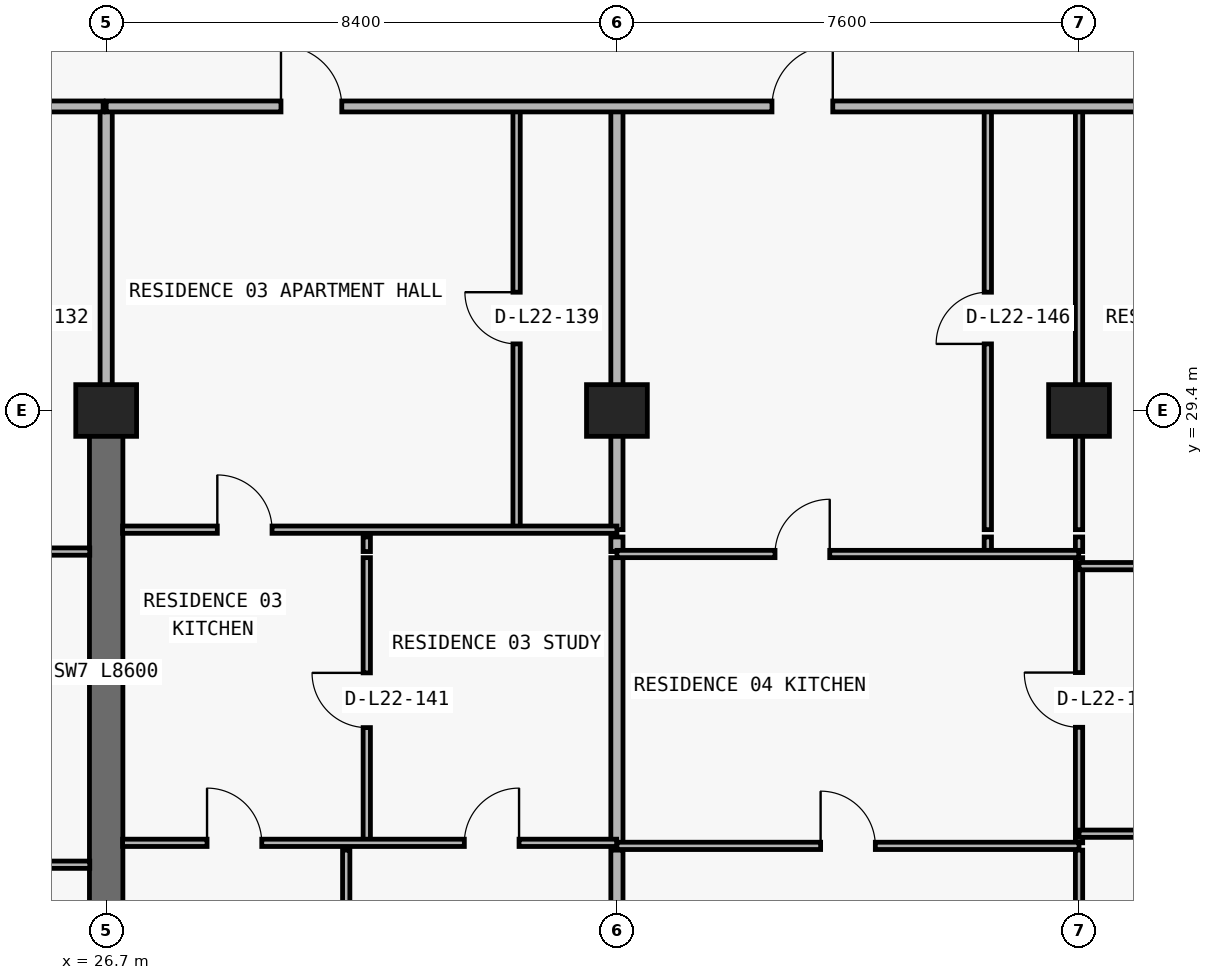
"""IFC4 building model, lengths in metres.
Left out: names, types, materials, properties, quantities, classifications, styles, units other than length and angle.
Written with IfcOpenShell. Run it as: python <this file> out.ifc"""

import sys

from ifc_helpers import new_model, si_unit, direction, frame, frame_2d, origin, origin_2d, place, context, subcontext, project, spatial, rectangle, extrude, element, fill, save


model = new_model("IFC4")
c1 = context("Model", 3, precision=1e-05, world=origin(), true_north=direction((0.0, 1.0)))
c2 = subcontext(c1, "Body", "Model", "MODEL_VIEW")
j1 = project(units=[si_unit("LENGTHUNIT", "METRE"), si_unit("PLANEANGLEUNIT", "RADIAN")], contexts=[c1])
p1 = place(None, origin())
s1 = spatial("IfcSite", under=j1, at=p1, CompositionType="ELEMENT")
p2 = place(p1, origin())
s2 = spatial("IfcBuilding", under=s1, at=p2, CompositionType="ELEMENT")
p3 = place(p2, frame((0.0, 0.0, 84.6)))
s3 = spatial("IfcBuildingStorey", under=s2, at=p3, CompositionType="ELEMENT", Elevation=84.6)
for number, where, z_axis, x_axis in (
    (1, (26.7, 29.4, 0.0), (0.0, 0.0, 1.0), (1.0, 0.0, 0.0)),
    (2, (35.1, 29.4, 0.0), (0.0, 0.0, 1.0), (1.0, 0.0, 0.0)),
    (3, (42.7, 29.4, 0.0), (0.0, 0.0, 1.0), (1.0, 0.0, 0.0)),
):
    element("IfcColumn", number, at=place(p3, frame(where, z_axis=z_axis, x_axis=x_axis)), inside=s3, PredefinedType="COLUMN", context=c2, shape_type="SweptSolid", body=[
        extrude(rectangle(XDim=1.0, YDim=0.85, at=origin_2d()), origin(), (0.0, 0.0, 1.0), 3.05),
    ])
p4 = place(p3, frame((26.7, 20.8, 0.0), z_axis=(0.0, 0.0, 1.0), x_axis=(0.0, 1.0, 0.0)))
e4 = element("IfcWall", 4, at=p4, inside=s3, PredefinedType="SHEAR", context=c2, shape_type="SweptSolid", body=[
    extrude(rectangle(XDim=8.6, YDim=0.55, at=frame_2d((4.3, 0.0))), origin(), (0.0, 0.0, 1.0), 3.05),
])
p5 = place(p3, frame((26.7, 29.405, 0.0), z_axis=(0.0, 0.0, 1.0), x_axis=(0.0, 1.0, 0.0)))
e5 = element("IfcWall", 5, at=p5, inside=s3, PredefinedType="PARTITIONING", context=c2, shape_type="SweptSolid", body=[
    extrude(rectangle(XDim=4.995, YDim=0.2, at=frame_2d((2.498, 0.0))), origin(), (0.0, 0.0, 1.0), 2.335),
])
p6 = place(p3, frame((30.648, 8.84, 0.0), z_axis=(0.0, 0.0, 1.0), x_axis=(0.0, 1.0, 0.0)))
e6 = element("IfcWall", 6, at=p6, inside=s3, PredefinedType="PARTITIONING", context=c2, shape_type="SweptSolid", body=[
    extrude(rectangle(XDim=13.33, YDim=0.12, at=frame_2d((6.665, 0.0))), origin(), (0.0, 0.0, 1.0), 3.05),
])
p7 = place(p3, frame((30.986, 22.29, 0.0), z_axis=(0.0, 0.0, 1.0), x_axis=(0.0, 1.0, 0.0)))
e7 = element("IfcWall", 7, at=p7, inside=s3, PredefinedType="PARTITIONING", context=c2, shape_type="SweptSolid", body=[
    extrude(rectangle(XDim=4.69, YDim=0.12, at=frame_2d((2.345, 0.0))), origin(), (0.0, 0.0, 1.0), 3.05),
])
p8 = place(p7, frame((1.895, 0.0, 0.0)))
e8 = element("IfcOpeningElement", 8, at=p8, cuts=e7, PredefinedType="OPENING", context=c2, shape_type="SweptSolid", body=[
    extrude(rectangle(XDim=0.9, YDim=2.15, at=frame_2d((0.45, 1.075))), frame((0.0, 0.07, 0.0), z_axis=(0.0, -1.0, 0.0), x_axis=(1.0, 0.0, 0.0)), (0.0, 0.0, 1.0), 0.14),
])
p9 = place(p3, frame((30.986, 27.08, 0.0), z_axis=(0.0, 0.0, 1.0), x_axis=(0.0, 1.0, 0.0)))
e9 = element("IfcWall", 9, at=p9, inside=s3, PredefinedType="PARTITIONING", context=c2, shape_type="SweptSolid", body=[
    extrude(rectangle(XDim=0.24, YDim=0.12, at=frame_2d((0.12, 0.0))), origin(), (0.0, 0.0, 1.0), 3.05),
])
p10 = place(p3, frame((33.45, 27.44, 0.0), z_axis=(0.0, 0.0, 1.0), x_axis=(0.0, 1.0, 0.0)))
e10 = element("IfcWall", 10, at=p10, inside=s3, PredefinedType="PARTITIONING", context=c2, shape_type="SweptSolid", body=[
    extrude(rectangle(XDim=6.96, YDim=0.12, at=frame_2d((3.48, 0.0))), origin(), (0.0, 0.0, 1.0), 3.05),
])
p11 = place(p10, frame((3.055, 0.0, 0.0)))
e11 = element("IfcOpeningElement", 11, at=p11, cuts=e10, PredefinedType="OPENING", context=c2, shape_type="SweptSolid", body=[
    extrude(rectangle(XDim=0.85, YDim=2.1, at=frame_2d((0.425, 1.05))), frame((0.0, 0.07, 0.0), z_axis=(0.0, -1.0, 0.0), x_axis=(1.0, 0.0, 0.0)), (0.0, 0.0, 1.0), 0.14),
])
p12 = place(p3, frame((35.1, 8.84, 0.0), z_axis=(0.0, 0.0, 1.0), x_axis=(0.0, 1.0, 0.0)))
e12 = element("IfcWall", 12, at=p12, inside=s3, PredefinedType="PARTITIONING", context=c2, shape_type="SweptSolid", body=[
    extrude(rectangle(XDim=13.33, YDim=0.2, at=frame_2d((6.665, 0.0))), origin(), (0.0, 0.0, 1.0), 2.174),
])
p13 = place(p3, frame((35.1, 22.29, 0.0), z_axis=(0.0, 0.0, 1.0), x_axis=(0.0, 1.0, 0.0)))
e13 = element("IfcWall", 13, at=p13, inside=s3, PredefinedType="PARTITIONING", context=c2, shape_type="SweptSolid", body=[
    extrude(rectangle(XDim=4.69, YDim=0.2, at=frame_2d((2.345, 0.0))), origin(), (0.0, 0.0, 1.0), 2.174),
])
p14 = place(p3, frame((35.1, 27.08, 0.0), z_axis=(0.0, 0.0, 1.0), x_axis=(0.0, 1.0, 0.0)))
e14 = element("IfcWall", 14, at=p14, inside=s3, PredefinedType="PARTITIONING", context=c2, shape_type="SweptSolid", body=[
    extrude(rectangle(XDim=0.24, YDim=0.2, at=frame_2d((0.12, 0.0))), origin(), (0.0, 0.0, 1.0), 2.174),
])
p15 = place(p3, frame((35.1, 27.44, 0.0), z_axis=(0.0, 0.0, 1.0), x_axis=(0.0, 1.0, 0.0)))
e15 = element("IfcWall", 15, at=p15, inside=s3, PredefinedType="PARTITIONING", context=c2, shape_type="SweptSolid", body=[
    extrude(rectangle(XDim=6.96, YDim=0.2, at=frame_2d((3.48, 0.0))), origin(), (0.0, 0.0, 1.0), 2.174),
])
p16 = place(p3, frame((41.2, 27.08, 0.0), z_axis=(0.0, 0.0, 1.0), x_axis=(0.0, 1.0, 0.0)))
e16 = element("IfcWall", 16, at=p16, inside=s3, PredefinedType="PARTITIONING", context=c2, shape_type="SweptSolid", body=[
    extrude(rectangle(XDim=0.24, YDim=0.12, at=frame_2d((0.12, 0.0))), origin(), (0.0, 0.0, 1.0), 3.05),
])
p17 = place(p3, frame((41.2, 27.44, 0.0), z_axis=(0.0, 0.0, 1.0), x_axis=(0.0, 1.0, 0.0)))
e17 = element("IfcWall", 17, at=p17, inside=s3, PredefinedType="PARTITIONING", context=c2, shape_type="SweptSolid", body=[
    extrude(rectangle(XDim=6.96, YDim=0.12, at=frame_2d((3.48, 0.0))), origin(), (0.0, 0.0, 1.0), 3.05),
])
p18 = place(p17, frame((3.055, 0.0, 0.0)))
e18 = element("IfcOpeningElement", 18, at=p18, cuts=e17, PredefinedType="OPENING", context=c2, shape_type="SweptSolid", body=[
    extrude(rectangle(XDim=0.85, YDim=2.1, at=frame_2d((0.425, 1.05))), frame((0.0, 0.07, 0.0), z_axis=(0.0, -1.0, 0.0), x_axis=(1.0, 0.0, 0.0)), (0.0, 0.0, 1.0), 0.14),
])
p19 = place(p3, frame((42.7, 8.84, 0.0), z_axis=(0.0, 0.0, 1.0), x_axis=(0.0, 1.0, 0.0)))
e19 = element("IfcWall", 19, at=p19, inside=s3, PredefinedType="PARTITIONING", context=c2, shape_type="SweptSolid", body=[
    extrude(rectangle(XDim=13.33, YDim=0.12, at=frame_2d((6.665, 0.0))), origin(), (0.0, 0.0, 1.0), 2.174),
])
p20 = place(p3, frame((42.7, 22.29, 0.0), z_axis=(0.0, 0.0, 1.0), x_axis=(0.0, 1.0, 0.0)))
e20 = element("IfcWall", 20, at=p20, inside=s3, PredefinedType="PARTITIONING", context=c2, shape_type="SweptSolid", body=[
    extrude(rectangle(XDim=4.69, YDim=0.12, at=frame_2d((2.345, 0.0))), origin(), (0.0, 0.0, 1.0), 2.174),
])
p21 = place(p20, frame((1.9, 0.0, 0.0)))
e21 = element("IfcOpeningElement", 21, at=p21, cuts=e20, PredefinedType="OPENING", context=c2, shape_type="SweptSolid", body=[
    extrude(rectangle(XDim=0.9, YDim=2.124, at=frame_2d((0.45, 1.062))), frame((0.0, 0.07, 0.0), z_axis=(0.0, -1.0, 0.0), x_axis=(1.0, 0.0, 0.0)), (0.0, 0.0, 1.0), 0.14),
])
p22 = place(p3, frame((42.7, 27.08, 0.0), z_axis=(0.0, 0.0, 1.0), x_axis=(0.0, 1.0, 0.0)))
e22 = element("IfcWall", 22, at=p22, inside=s3, PredefinedType="PARTITIONING", context=c2, shape_type="SweptSolid", body=[
    extrude(rectangle(XDim=0.24, YDim=0.12, at=frame_2d((0.12, 0.0))), origin(), (0.0, 0.0, 1.0), 2.174),
])
p23 = place(p3, frame((42.7, 27.44, 0.0), z_axis=(0.0, 0.0, 1.0), x_axis=(0.0, 1.0, 0.0)))
e23 = element("IfcWall", 23, at=p23, inside=s3, PredefinedType="PARTITIONING", context=c2, shape_type="SweptSolid", body=[
    extrude(rectangle(XDim=6.96, YDim=0.12, at=frame_2d((3.48, 0.0))), origin(), (0.0, 0.0, 1.0), 2.174),
])
p24 = place(p3, frame((18.3, 21.93, 0.0), z_axis=(0.0, 0.0, 1.0), x_axis=(1.0, 0.0, 0.0)))
e24 = element("IfcWall", 24, at=p24, inside=s3, PredefinedType="PARTITIONING", context=c2, shape_type="SweptSolid", body=[
    extrude(rectangle(XDim=8.13, YDim=0.12, at=frame_2d((4.065, 0.0))), origin(), (0.0, 0.0, 1.0), 3.05),
])
p25 = place(p24, frame((1.86, 0.0, 0.0)))
e25 = element("IfcOpeningElement", 25, at=p25, cuts=e24, PredefinedType="OPENING", context=c2, shape_type="SweptSolid", body=[
    extrude(rectangle(XDim=0.9, YDim=2.15, at=frame_2d((0.45, 1.075))), frame((0.0, 0.07, 0.0), z_axis=(0.0, -1.0, 0.0), x_axis=(1.0, 0.0, 0.0)), (0.0, 0.0, 1.0), 0.14),
])
p26 = place(p24, frame((6.008, 0.0, 0.0)))
e26 = element("IfcOpeningElement", 26, at=p26, cuts=e24, PredefinedType="OPENING", context=c2, shape_type="SweptSolid", body=[
    extrude(rectangle(XDim=0.9, YDim=2.15, at=frame_2d((0.45, 1.075))), frame((0.0, 0.07, 0.0), z_axis=(0.0, -1.0, 0.0), x_axis=(1.0, 0.0, 0.0)), (0.0, 0.0, 1.0), 0.14),
])
p27 = place(p3, frame((35.1, 22.24, 0.0), z_axis=(0.0, 0.0, 1.0), x_axis=(1.0, 0.0, 0.0)))
e27 = element("IfcWall", 27, at=p27, inside=s3, PredefinedType="PARTITIONING", context=c2, shape_type="SweptSolid", body=[
    extrude(rectangle(XDim=7.6, YDim=0.12, at=frame_2d((3.8, 0.0))), origin(), (0.0, 0.0, 1.0), 3.05),
])
p28 = place(p27, frame((3.35, 0.0, 0.0)))
e28 = element("IfcOpeningElement", 28, at=p28, cuts=e27, PredefinedType="OPENING", context=c2, shape_type="SweptSolid", body=[
    extrude(rectangle(XDim=0.9, YDim=2.15, at=frame_2d((0.45, 1.075))), frame((0.0, 0.07, 0.0), z_axis=(0.0, -1.0, 0.0), x_axis=(1.0, 0.0, 0.0)), (0.0, 0.0, 1.0), 0.14),
])
p29 = place(p3, frame((26.97, 22.29, 0.0), z_axis=(0.0, 0.0, 1.0), x_axis=(1.0, 0.0, 0.0)))
e29 = element("IfcWall", 29, at=p29, inside=s3, PredefinedType="PARTITIONING", context=c2, shape_type="SweptSolid", body=[
    extrude(rectangle(XDim=8.125, YDim=0.12, at=frame_2d((4.062, 0.0))), origin(), (0.0, 0.0, 1.0), 3.05),
])
p30 = place(p29, frame((1.389, 0.0, 0.0)))
e30 = element("IfcOpeningElement", 30, at=p30, cuts=e29, PredefinedType="OPENING", context=c2, shape_type="SweptSolid", body=[
    extrude(rectangle(XDim=0.9, YDim=2.15, at=frame_2d((0.45, 1.075))), frame((0.0, 0.07, 0.0), z_axis=(0.0, -1.0, 0.0), x_axis=(1.0, 0.0, 0.0)), (0.0, 0.0, 1.0), 0.14),
])
p31 = place(p29, frame((5.621, 0.0, 0.0)))
e31 = element("IfcOpeningElement", 31, at=p31, cuts=e29, PredefinedType="OPENING", context=c2, shape_type="SweptSolid", body=[
    extrude(rectangle(XDim=0.9, YDim=2.15, at=frame_2d((0.45, 1.075))), frame((0.0, 0.07, 0.0), z_axis=(0.0, -1.0, 0.0), x_axis=(1.0, 0.0, 0.0)), (0.0, 0.0, 1.0), 0.14),
])
p32 = place(p3, frame((42.7, 22.44, 0.0), z_axis=(0.0, 0.0, 1.0), x_axis=(1.0, 0.0, 0.0)))
e32 = element("IfcWall", 32, at=p32, inside=s3, PredefinedType="PARTITIONING", context=c2, shape_type="SweptSolid", body=[
    extrude(rectangle(XDim=8.13, YDim=0.12, at=frame_2d((4.065, 0.0))), origin(), (0.0, 0.0, 1.0), 3.05),
])
p33 = place(p32, frame((3.615, 0.0, 0.0)))
e33 = element("IfcOpeningElement", 33, at=p33, cuts=e32, PredefinedType="OPENING", context=c2, shape_type="SweptSolid", body=[
    extrude(rectangle(XDim=0.9, YDim=2.15, at=frame_2d((0.45, 1.075))), frame((0.0, 0.07, 0.0), z_axis=(0.0, -1.0, 0.0), x_axis=(1.0, 0.0, 0.0)), (0.0, 0.0, 1.0), 0.14),
])
p34 = place(p3, frame((42.7, 26.84, 0.0), z_axis=(0.0, 0.0, 1.0), x_axis=(1.0, 0.0, 0.0)))
e34 = element("IfcWall", 34, at=p34, inside=s3, PredefinedType="PARTITIONING", context=c2, shape_type="SweptSolid", body=[
    extrude(rectangle(XDim=8.13, YDim=0.12, at=frame_2d((4.065, 0.0))), origin(), (0.0, 0.0, 1.0), 3.05),
])
p35 = place(p34, frame((3.0, 0.0, 0.0)))
e35 = element("IfcOpeningElement", 35, at=p35, cuts=e34, PredefinedType="OPENING", context=c2, shape_type="SweptSolid", body=[
    extrude(rectangle(XDim=0.9, YDim=2.15, at=frame_2d((0.45, 1.075))), frame((0.0, 0.07, 0.0), z_axis=(0.0, -1.0, 0.0), x_axis=(1.0, 0.0, 0.0)), (0.0, 0.0, 1.0), 0.14),
])
p36 = place(p3, frame((35.1, 27.04, 0.0), z_axis=(0.0, 0.0, 1.0), x_axis=(1.0, 0.0, 0.0)))
e36 = element("IfcWall", 36, at=p36, inside=s3, PredefinedType="PARTITIONING", context=c2, shape_type="SweptSolid", body=[
    extrude(rectangle(XDim=7.595, YDim=0.12, at=frame_2d((3.797, 0.0))), origin(), (0.0, 0.0, 1.0), 3.05),
])
p37 = place(p36, frame((2.6, 0.0, 0.0)))
e37 = element("IfcOpeningElement", 37, at=p37, cuts=e36, PredefinedType="OPENING", context=c2, shape_type="SweptSolid", body=[
    extrude(rectangle(XDim=0.9, YDim=2.15, at=frame_2d((0.45, 1.075))), frame((0.0, 0.07, 0.0), z_axis=(0.0, -1.0, 0.0), x_axis=(1.0, 0.0, 0.0)), (0.0, 0.0, 1.0), 0.14),
])
p38 = place(p3, frame((18.3, 27.08, 0.0), z_axis=(0.0, 0.0, 1.0), x_axis=(1.0, 0.0, 0.0)))
e38 = element("IfcWall", 38, at=p38, inside=s3, PredefinedType="PARTITIONING", context=c2, shape_type="SweptSolid", body=[
    extrude(rectangle(XDim=8.13, YDim=0.12, at=frame_2d((4.065, 0.0))), origin(), (0.0, 0.0, 1.0), 3.05),
])
p39 = place(p38, frame((1.943, 0.0, 0.0)))
e39 = element("IfcOpeningElement", 39, at=p39, cuts=e38, PredefinedType="OPENING", context=c2, shape_type="SweptSolid", body=[
    extrude(rectangle(XDim=0.9, YDim=2.15, at=frame_2d((0.45, 1.075))), frame((0.0, 0.07, 0.0), z_axis=(0.0, -1.0, 0.0), x_axis=(1.0, 0.0, 0.0)), (0.0, 0.0, 1.0), 0.14),
])
p40 = place(p3, frame((26.97, 27.44, 0.0), z_axis=(0.0, 0.0, 1.0), x_axis=(1.0, 0.0, 0.0)))
e40 = element("IfcWall", 40, at=p40, inside=s3, PredefinedType="PARTITIONING", context=c2, shape_type="SweptSolid", body=[
    extrude(rectangle(XDim=8.13, YDim=0.12, at=frame_2d((4.065, 0.0))), origin(), (0.0, 0.0, 1.0), 3.05),
])
p41 = place(p40, frame((1.558, 0.0, 0.0)))
e41 = element("IfcOpeningElement", 41, at=p41, cuts=e40, PredefinedType="OPENING", context=c2, shape_type="SweptSolid", body=[
    extrude(rectangle(XDim=0.9, YDim=2.15, at=frame_2d((0.45, 1.075))), frame((0.0, 0.07, 0.0), z_axis=(0.0, -1.0, 0.0), x_axis=(1.0, 0.0, 0.0)), (0.0, 0.0, 1.0), 0.14),
])
p42 = place(p3, frame((18.3, 34.4, 0.0), z_axis=(0.0, 0.0, 1.0), x_axis=(1.0, 0.0, 0.0)))
e42 = element("IfcWall", 42, at=p42, inside=s3, PredefinedType="PARTITIONING", context=c2, shape_type="SweptSolid", body=[
    extrude(rectangle(XDim=8.35, YDim=0.18, at=frame_2d((4.175, 0.0))), origin(), (0.0, 0.0, 1.0), 3.05),
])
p43 = place(p42, frame((2.875, 0.0, 0.0)))
e43 = element("IfcOpeningElement", 43, at=p43, cuts=e42, PredefinedType="OPENING", context=c2, shape_type="SweptSolid", body=[
    extrude(rectangle(XDim=1.0, YDim=2.2, at=frame_2d((0.5, 1.1))), frame((0.0, 0.1, 0.0), z_axis=(0.0, -1.0, 0.0), x_axis=(1.0, 0.0, 0.0)), (0.0, 0.0, 1.0), 0.2),
])
p44 = place(p3, frame((26.7, 34.4, 0.0), z_axis=(0.0, 0.0, 1.0), x_axis=(1.0, 0.0, 0.0)))
e44 = element("IfcWall", 44, at=p44, inside=s3, PredefinedType="PARTITIONING", context=c2, shape_type="SweptSolid", body=[
    extrude(rectangle(XDim=29.186, YDim=0.18, at=frame_2d((14.593, 0.0))), origin(), (0.0, 0.0, 1.0), 3.05),
])
p45 = place(p44, frame((2.875, 0.0, 0.0)))
e45 = element("IfcOpeningElement", 45, at=p45, cuts=e44, PredefinedType="OPENING", context=c2, shape_type="SweptSolid", body=[
    extrude(rectangle(XDim=1.0, YDim=2.2, at=frame_2d((0.5, 1.1))), frame((0.0, 0.1, 0.0), z_axis=(0.0, -1.0, 0.0), x_axis=(1.0, 0.0, 0.0)), (0.0, 0.0, 1.0), 0.2),
])
p46 = place(p44, frame((10.95, 0.0, 0.0)))
e46 = element("IfcOpeningElement", 46, at=p46, cuts=e44, PredefinedType="OPENING", context=c2, shape_type="SweptSolid", body=[
    extrude(rectangle(XDim=1.0, YDim=2.2, at=frame_2d((0.5, 1.1))), frame((0.0, 0.1, 0.0), z_axis=(0.0, -1.0, 0.0), x_axis=(1.0, 0.0, 0.0)), (0.0, 0.0, 1.0), 0.2),
])
p47 = place(p44, frame((26.293, 0.0, 0.0)))
e47 = element("IfcOpeningElement", 47, at=p47, cuts=e44, PredefinedType="OPENING", context=c2, shape_type="SweptSolid", body=[
    extrude(rectangle(XDim=1.0, YDim=2.2, at=frame_2d((0.5, 1.1))), frame((0.0, 0.1, 0.0), z_axis=(0.0, -1.0, 0.0), x_axis=(1.0, 0.0, 0.0)), (0.0, 0.0, 1.0), 0.2),
])
p48 = place(p45, origin())
e48 = element("IfcDoor", 48, at=p48, inside=s3, OperationType="SINGLE_SWING_LEFT", PredefinedType="DOOR", context=c2, shape_type="SweptSolid", body=[
    extrude(rectangle(XDim=1.0, YDim=2.2, at=frame_2d((0.5, 1.1))), frame((0.0, 0.025, 0.0), z_axis=(0.0, -1.0, 0.0), x_axis=(1.0, 0.0, 0.0)), (0.0, 0.0, 1.0), 0.05),
])
fill(e45, e48)
p49 = place(p11, origin())
e49 = element("IfcDoor", 49, at=p49, inside=s3, OperationType="SINGLE_SWING_RIGHT", PredefinedType="DOOR", context=c2, shape_type="SweptSolid", body=[
    extrude(rectangle(XDim=0.85, YDim=2.1, at=frame_2d((0.425, 1.05))), frame((0.0, 0.025, 0.0), z_axis=(0.0, -1.0, 0.0), x_axis=(1.0, 0.0, 0.0)), (0.0, 0.0, 1.0), 0.05),
])
fill(e11, e49)
p50 = place(p41, origin())
e50 = element("IfcDoor", 50, at=p50, inside=s3, OperationType="SINGLE_SWING_LEFT", PredefinedType="DOOR", context=c2, shape_type="SweptSolid", body=[
    extrude(rectangle(XDim=0.9, YDim=2.15, at=frame_2d((0.45, 1.075))), frame((0.0, 0.025, 0.0), z_axis=(0.0, -1.0, 0.0), x_axis=(1.0, 0.0, 0.0)), (0.0, 0.0, 1.0), 0.05),
])
fill(e41, e50)
p51 = place(p8, origin())
e51 = element("IfcDoor", 51, at=p51, inside=s3, OperationType="SINGLE_SWING_RIGHT", PredefinedType="DOOR", context=c2, shape_type="SweptSolid", body=[
    extrude(rectangle(XDim=0.9, YDim=2.15, at=frame_2d((0.45, 1.075))), frame((0.0, 0.025, 0.0), z_axis=(0.0, -1.0, 0.0), x_axis=(1.0, 0.0, 0.0)), (0.0, 0.0, 1.0), 0.05),
])
fill(e8, e51)
p52 = place(p30, origin())
e52 = element("IfcDoor", 52, at=p52, inside=s3, OperationType="SINGLE_SWING_LEFT", PredefinedType="DOOR", context=c2, shape_type="SweptSolid", body=[
    extrude(rectangle(XDim=0.9, YDim=2.15, at=frame_2d((0.45, 1.075))), frame((0.0, 0.025, 0.0), z_axis=(0.0, -1.0, 0.0), x_axis=(1.0, 0.0, 0.0)), (0.0, 0.0, 1.0), 0.05),
])
fill(e30, e52)
p53 = place(p31, origin())
e53 = element("IfcDoor", 53, at=p53, inside=s3, OperationType="SINGLE_SWING_RIGHT", PredefinedType="DOOR", context=c2, shape_type="SweptSolid", body=[
    extrude(rectangle(XDim=0.9, YDim=2.15, at=frame_2d((0.45, 1.075))), frame((0.0, 0.025, 0.0), z_axis=(0.0, -1.0, 0.0), x_axis=(1.0, 0.0, 0.0)), (0.0, 0.0, 1.0), 0.05),
])
fill(e31, e53)
p54 = place(p46, origin())
e54 = element("IfcDoor", 54, at=p54, inside=s3, OperationType="SINGLE_SWING_RIGHT", PredefinedType="DOOR", context=c2, shape_type="SweptSolid", body=[
    extrude(rectangle(XDim=1.0, YDim=2.2, at=frame_2d((0.5, 1.1))), frame((0.0, 0.025, 0.0), z_axis=(0.0, -1.0, 0.0), x_axis=(1.0, 0.0, 0.0)), (0.0, 0.0, 1.0), 0.05),
])
fill(e46, e54)
p55 = place(p18, origin())
e55 = element("IfcDoor", 55, at=p55, inside=s3, OperationType="SINGLE_SWING_LEFT", PredefinedType="DOOR", context=c2, shape_type="SweptSolid", body=[
    extrude(rectangle(XDim=0.85, YDim=2.1, at=frame_2d((0.425, 1.05))), frame((0.0, 0.025, 0.0), z_axis=(0.0, -1.0, 0.0), x_axis=(1.0, 0.0, 0.0)), (0.0, 0.0, 1.0), 0.05),
])
fill(e18, e55)
p56 = place(p37, origin())
e56 = element("IfcDoor", 56, at=p56, inside=s3, OperationType="SINGLE_SWING_RIGHT", PredefinedType="DOOR", context=c2, shape_type="SweptSolid", body=[
    extrude(rectangle(XDim=0.9, YDim=2.15, at=frame_2d((0.45, 1.075))), frame((0.0, 0.025, 0.0), z_axis=(0.0, -1.0, 0.0), x_axis=(1.0, 0.0, 0.0)), (0.0, 0.0, 1.0), 0.05),
])
fill(e37, e56)
p57 = place(p28, origin())
e57 = element("IfcDoor", 57, at=p57, inside=s3, OperationType="SINGLE_SWING_LEFT", PredefinedType="DOOR", context=c2, shape_type="SweptSolid", body=[
    extrude(rectangle(XDim=0.9, YDim=2.15, at=frame_2d((0.45, 1.075))), frame((0.0, 0.025, 0.0), z_axis=(0.0, -1.0, 0.0), x_axis=(1.0, 0.0, 0.0)), (0.0, 0.0, 1.0), 0.05),
])
fill(e28, e57)
p58 = place(p21, origin())
e58 = element("IfcDoor", 58, at=p58, inside=s3, OperationType="SINGLE_SWING_RIGHT", PredefinedType="DOOR", context=c2, shape_type="SweptSolid", body=[
    extrude(rectangle(XDim=0.9, YDim=2.124, at=frame_2d((0.45, 1.062))), frame((0.0, 0.025, 0.0), z_axis=(0.0, -1.0, 0.0), x_axis=(1.0, 0.0, 0.0)), (0.0, 0.0, 1.0), 0.05),
])
fill(e21, e58)
save(model, sys.argv[1])
